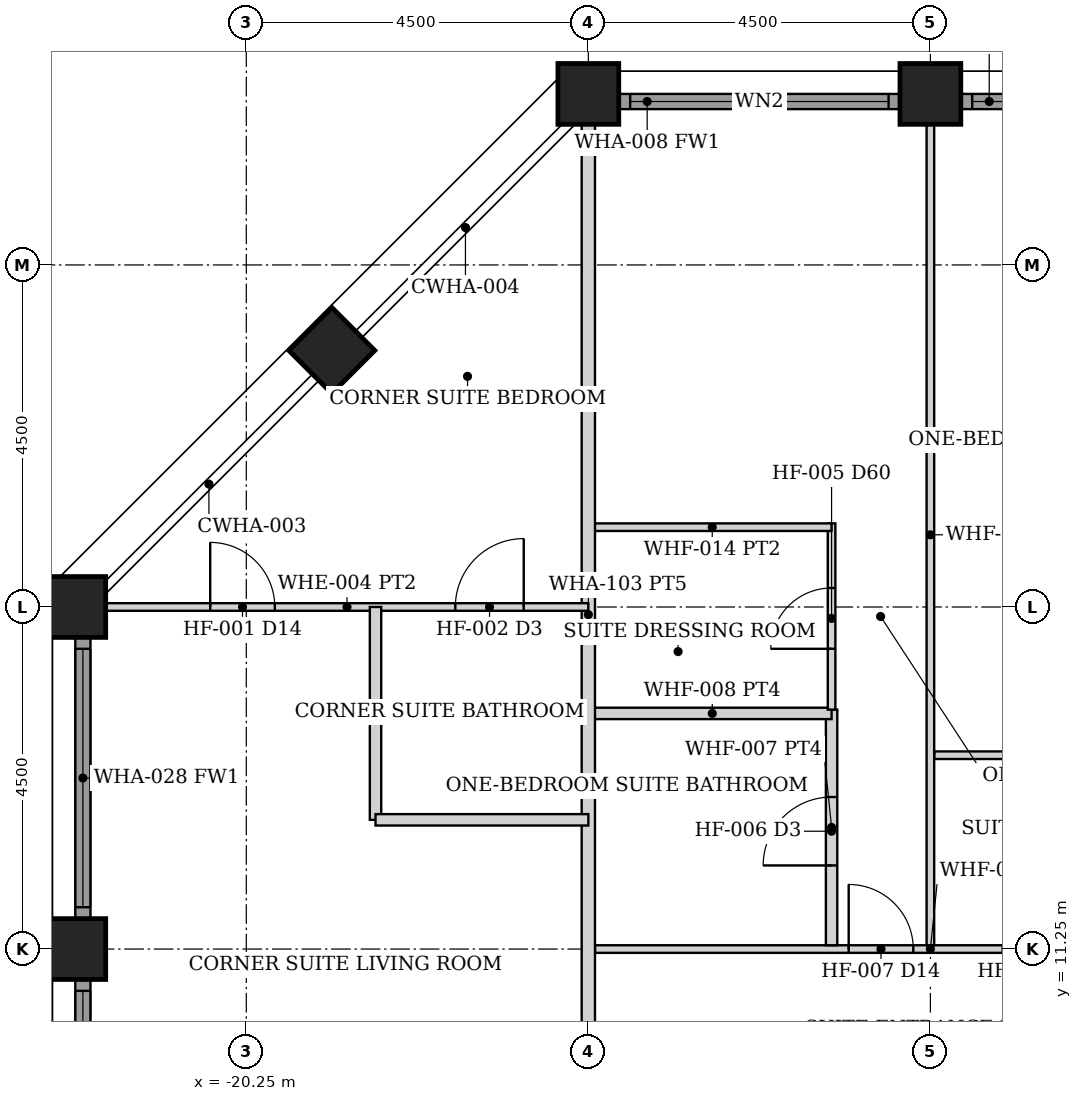
"""IFC4 building model, lengths in metres.
Left out: names, types, materials, properties, quantities, classifications, styles, units other than length and angle.
Written with IfcOpenShell. Run it as: python <this file> out.ifc"""

import sys

from ifc_helpers import new_model, si_unit, direction, frame, frame_2d, origin, origin_2d, place, context, subcontext, project, spatial, rectangle, hollow_rectangle, extrude, element, fill, save


model = new_model("IFC4")
c1 = context("Model", 3, precision=1e-05, world=origin(), true_north=direction((0.0, 1.0)))
c2 = subcontext(c1, "Body", "Model", "MODEL_VIEW")
j1 = project(units=[si_unit("LENGTHUNIT", "METRE"), si_unit("PLANEANGLEUNIT", "RADIAN")], contexts=[c1])
p1 = place(None, origin())
s1 = spatial("IfcSite", under=j1, at=p1, CompositionType="ELEMENT")
p2 = place(p1, origin())
s2 = spatial("IfcBuilding", under=s1, at=p2, CompositionType="ELEMENT")
p3 = place(p2, frame((0.0, 0.0, 172.4)))
s3 = spatial("IfcBuildingStorey", under=s2, at=p3, CompositionType="ELEMENT", Elevation=172.4)
for number, where, z_axis, x_axis in (
    (1, (-15.75, 22.5, 0.0), (0.0, 0.0, 1.0), (0.0, 1.0, 0.0)),
    (2, (-11.25, 22.5, 0.0), (0.0, 0.0, 1.0), (0.0, 1.0, 0.0)),
    (3, (-22.5, 11.25, 0.0), (0.0, 0.0, 1.0), (1.0, 0.0, 0.0)),
    (4, (-22.5, 15.75, 0.0), (0.0, 0.0, 1.0), (1.0, 0.0, 0.0)),
    (5, (-19.125, 19.125, 0.0), (0.0, 0.0, 1.0), (0.707, -0.707, 0.0)),
):
    element("IfcColumn", number, at=place(p3, frame(where, z_axis=z_axis, x_axis=x_axis)), inside=s3, PredefinedType="COLUMN", context=c2, shape_type="SweptSolid", body=[
        extrude(hollow_rectangle(XDim=0.8, YDim=0.8, WallThickness=0.045, at=origin_2d()), origin(), (0.0, 0.0, 1.0), 3.6),
    ])
p4 = place(p3, frame((-15.345, 22.4, 0.0), z_axis=(0.0, 0.0, 1.0), x_axis=(1.0, 0.0, 0.0)))
e6 = element("IfcWall", 6, at=p4, inside=s3, PredefinedType="SOLIDWALL", context=c2, shape_type="SweptSolid", body=[
    extrude(rectangle(XDim=3.69, YDim=0.2, at=frame_2d((1.845, 0.0))), origin(), (0.0, 0.0, 1.0), 2.479),
])
p5 = place(p4, frame((0.145, 0.0, 0.3)))
e7 = element("IfcOpeningElement", 7, at=p5, cuts=e6, PredefinedType="OPENING", context=c2, shape_type="SweptSolid", body=[
    extrude(rectangle(XDim=3.4, YDim=2.029, at=frame_2d((1.7, 1.015))), frame((0.0, 0.11, 0.0), z_axis=(0.0, -1.0, 0.0), x_axis=(1.0, 0.0, 0.0)), (0.0, 0.0, 1.0), 0.22),
])
p6 = place(p3, frame((-10.845, 22.4, 0.0), z_axis=(0.0, 0.0, 1.0), x_axis=(1.0, 0.0, 0.0)))
e8 = element("IfcWall", 8, at=p6, inside=s3, PredefinedType="SOLIDWALL", context=c2, shape_type="SweptSolid", body=[
    extrude(rectangle(XDim=3.69, YDim=0.2, at=frame_2d((1.845, 0.0))), origin(), (0.0, 0.0, 1.0), 2.479),
])
p7 = place(p6, frame((0.145, 0.0, 0.3)))
e9 = element("IfcOpeningElement", 9, at=p7, cuts=e8, PredefinedType="OPENING", context=c2, shape_type="SweptSolid", body=[
    extrude(rectangle(XDim=3.4, YDim=2.029, at=frame_2d((1.7, 1.015))), frame((0.0, 0.11, 0.0), z_axis=(0.0, -1.0, 0.0), x_axis=(1.0, 0.0, 0.0)), (0.0, 0.0, 1.0), 0.22),
])
p8 = place(p3, frame((-22.4, 7.155, 0.0), z_axis=(0.0, 0.0, 1.0), x_axis=(0.0, 1.0, 0.0)))
e10 = element("IfcWall", 10, at=p8, inside=s3, PredefinedType="SOLIDWALL", context=c2, shape_type="SweptSolid", body=[
    extrude(rectangle(XDim=3.69, YDim=0.2, at=frame_2d((1.845, 0.0))), origin(), (0.0, 0.0, 1.0), 2.479),
])
p9 = place(p8, frame((0.145, 0.0, 0.3)))
e11 = element("IfcOpeningElement", 11, at=p9, cuts=e10, PredefinedType="OPENING", context=c2, shape_type="SweptSolid", body=[
    extrude(rectangle(XDim=3.4, YDim=2.029, at=frame_2d((1.7, 1.015))), frame((0.0, 0.11, 0.0), z_axis=(0.0, -1.0, 0.0), x_axis=(1.0, 0.0, 0.0)), (0.0, 0.0, 1.0), 0.22),
])
p10 = place(p3, frame((-22.4, 11.655, 0.0), z_axis=(0.0, 0.0, 1.0), x_axis=(0.0, 1.0, 0.0)))
e12 = element("IfcWall", 12, at=p10, inside=s3, PredefinedType="SOLIDWALL", context=c2, shape_type="SweptSolid", body=[
    extrude(rectangle(XDim=3.69, YDim=0.2, at=frame_2d((1.845, 0.0))), origin(), (0.0, 0.0, 1.0), 2.479),
])
p11 = place(p10, frame((0.145, 0.0, 0.3)))
e13 = element("IfcOpeningElement", 13, at=p11, cuts=e12, PredefinedType="OPENING", context=c2, shape_type="SweptSolid", body=[
    extrude(rectangle(XDim=3.4, YDim=2.029, at=frame_2d((1.7, 1.015))), frame((0.0, 0.11, 0.0), z_axis=(0.0, -1.0, 0.0), x_axis=(1.0, 0.0, 0.0)), (0.0, 0.0, 1.0), 0.22),
])
p12 = place(p3, frame((-15.663, 11.25, 0.0), z_axis=(0.0, 0.0, 1.0), x_axis=(1.0, 0.0, 0.0)))
e14 = element("IfcWall", 14, at=p12, inside=s3, PredefinedType="PARTITIONING", context=c2, shape_type="SweptSolid", body=[
    extrude(rectangle(XDim=8.825, YDim=0.1, at=frame_2d((4.413, 0.0))), origin(), (0.0, 0.0, 1.0), 2.473),
])
p13 = place(p12, frame((5.363, 0.0, 0.0)))
e15 = element("IfcOpeningElement", 15, at=p13, cuts=e14, PredefinedType="OPENING", context=c2, shape_type="SweptSolid", body=[
    extrude(rectangle(XDim=0.9, YDim=2.1, at=frame_2d((0.45, 1.05))), frame((0.0, 0.06, 0.0), z_axis=(0.0, -1.0, 0.0), x_axis=(1.0, 0.0, 0.0)), (0.0, 0.0, 1.0), 0.12),
])
p14 = place(p12, frame((7.613, 0.0, 0.0)))
e16 = element("IfcOpeningElement", 16, at=p14, cuts=e14, PredefinedType="OPENING", context=c2, shape_type="SweptSolid", body=[
    extrude(rectangle(XDim=0.9, YDim=2.1, at=frame_2d((0.45, 1.05))), frame((0.0, 0.06, 0.0), z_axis=(0.0, -1.0, 0.0), x_axis=(1.0, 0.0, 0.0)), (0.0, 0.0, 1.0), 0.12),
])
p15 = place(p12, frame((3.337, 0.0, 0.0)))
e17 = element("IfcOpeningElement", 17, at=p15, cuts=e14, PredefinedType="OPENING", context=c2, shape_type="SweptSolid", body=[
    extrude(rectangle(XDim=0.85, YDim=2.1, at=frame_2d((0.425, 1.05))), frame((0.0, 0.06, 0.0), z_axis=(0.0, -1.0, 0.0), x_axis=(1.0, 0.0, 0.0)), (0.0, 0.0, 1.0), 0.12),
])
p16 = place(p3, frame((-11.2, 13.8, 0.0), z_axis=(0.0, 0.0, 1.0), x_axis=(1.0, 0.0, 0.0)))
e18 = element("IfcWall", 18, at=p16, inside=s3, PredefinedType="PARTITIONING", context=c2, shape_type="SweptSolid", body=[
    extrude(rectangle(XDim=2.75, YDim=0.1, at=frame_2d((1.375, 0.0))), origin(), (0.0, 0.0, 1.0), 2.473),
])
p17 = place(p3, frame((-11.25, 11.3, 0.0), z_axis=(0.0, 0.0, 1.0), x_axis=(0.0, 1.0, 0.0)))
e19 = element("IfcWall", 19, at=p17, inside=s3, PredefinedType="PARTITIONING", context=c2, shape_type="SweptSolid", body=[
    extrude(rectangle(XDim=10.8, YDim=0.1, at=frame_2d((5.4, 0.0))), origin(), (0.0, 0.0, 1.0), 2.473),
])
p18 = place(p3, frame((-12.55, 11.3, 0.0), z_axis=(0.0, 0.0, 1.0), x_axis=(0.0, 1.0, 0.0)))
e20 = element("IfcWall", 20, at=p18, inside=s3, PredefinedType="PARTITIONING", context=c2, shape_type="SweptSolid", body=[
    extrude(rectangle(XDim=3.1, YDim=0.15, at=frame_2d((1.55, 0.0))), origin(), (0.0, 0.0, 1.0), 2.473),
])
p19 = place(p18, frame((1.05, 0.0, 0.0)))
e21 = element("IfcOpeningElement", 21, at=p19, cuts=e20, PredefinedType="OPENING", context=c2, shape_type="SweptSolid", body=[
    extrude(rectangle(XDim=0.9, YDim=2.1, at=frame_2d((0.45, 1.05))), frame((0.0, 0.085, 0.0), z_axis=(0.0, -1.0, 0.0), x_axis=(1.0, 0.0, 0.0)), (0.0, 0.0, 1.0), 0.17),
])
p20 = place(p3, frame((-15.69, 14.35, 0.0), z_axis=(0.0, 0.0, 1.0), x_axis=(1.0, 0.0, 0.0)))
e22 = element("IfcWall", 22, at=p20, inside=s3, PredefinedType="PARTITIONING", context=c2, shape_type="SweptSolid", body=[
    extrude(rectangle(XDim=3.14, YDim=0.15, at=frame_2d((1.57, 0.0))), origin(), (0.0, 0.0, 1.0), 2.473),
])
p21 = place(p3, frame((-12.55, 14.4, 0.0), z_axis=(0.0, 0.0, 1.0), x_axis=(0.0, 1.0, 0.0)))
e23 = element("IfcWall", 23, at=p21, inside=s3, PredefinedType="PARTITIONING", context=c2, shape_type="SweptSolid", body=[
    extrude(rectangle(XDim=2.45, YDim=0.1, at=frame_2d((1.225, 0.0))), origin(), (0.0, 0.0, 1.0), 2.473),
])
p22 = place(p21, frame((0.8, 0.0, 0.0)))
e24 = element("IfcOpeningElement", 24, at=p22, cuts=e23, PredefinedType="OPENING", context=c2, shape_type="SweptSolid", body=[
    extrude(rectangle(XDim=0.8, YDim=2.1, at=frame_2d((0.4, 1.05))), frame((0.0, 0.06, 0.0), z_axis=(0.0, -1.0, 0.0), x_axis=(1.0, 0.0, 0.0)), (0.0, 0.0, 1.0), 0.12),
])
p23 = place(p3, frame((-15.69, 16.8, 0.0), z_axis=(0.0, 0.0, 1.0), x_axis=(1.0, 0.0, 0.0)))
e25 = element("IfcWall", 25, at=p23, inside=s3, PredefinedType="PARTITIONING", context=c2, shape_type="SweptSolid", body=[
    extrude(rectangle(XDim=3.14, YDim=0.1, at=frame_2d((1.57, 0.0))), origin(), (0.0, 0.0, 1.0), 2.473),
])
p24 = place(p3, frame((-15.75, 9.2, 0.0), z_axis=(0.0, 0.0, 1.0), x_axis=(0.0, 1.0, 0.0)))
e26 = element("IfcWall", 26, at=p24, inside=s3, PredefinedType="PARTITIONING", context=c2, shape_type="SweptSolid", body=[
    extrude(rectangle(XDim=12.9, YDim=0.175, at=frame_2d((6.45, 0.0))), origin(), (0.0, 0.0, 1.0), 2.473),
])
p25 = place(p3, frame((-22.1, 15.75, 0.0), z_axis=(0.0, 0.0, 1.0), x_axis=(1.0, 0.0, 0.0)))
e27 = element("IfcWall", 27, at=p25, inside=s3, PredefinedType="PARTITIONING", context=c2, shape_type="SweptSolid", body=[
    extrude(rectangle(XDim=6.35, YDim=0.1, at=frame_2d((3.175, 0.0))), origin(), (0.0, 0.0, 1.0), 2.473),
])
p26 = place(p25, frame((1.375, 0.0, 0.0)))
e28 = element("IfcOpeningElement", 28, at=p26, cuts=e27, PredefinedType="OPENING", context=c2, shape_type="SweptSolid", body=[
    extrude(rectangle(XDim=0.85, YDim=2.1, at=frame_2d((0.425, 1.05))), frame((0.0, 0.06, 0.0), z_axis=(0.0, -1.0, 0.0), x_axis=(1.0, 0.0, 0.0)), (0.0, 0.0, 1.0), 0.12),
])
p27 = place(p25, frame((4.6, 0.0, 0.0)))
e29 = element("IfcOpeningElement", 29, at=p27, cuts=e27, PredefinedType="OPENING", context=c2, shape_type="SweptSolid", body=[
    extrude(rectangle(XDim=0.9, YDim=2.1, at=frame_2d((0.45, 1.05))), frame((0.0, 0.06, 0.0), z_axis=(0.0, -1.0, 0.0), x_axis=(1.0, 0.0, 0.0)), (0.0, 0.0, 1.0), 0.12),
])
for number, where, z_axis, x_axis in (
    (30, (-18.55, 12.95, 0.0), (0.0, 0.0, 1.0), (0.0, 1.0, 0.0)),
    (31, (-18.55, 12.95, 0.0), (0.0, 0.0, 1.0), (1.0, 0.0, 0.0)),
):
    element("IfcWall", number, at=place(p3, frame(where, z_axis=z_axis, x_axis=x_axis)), inside=s3, PredefinedType="PARTITIONING", context=c2, shape_type="SweptSolid", body=[
        extrude(rectangle(XDim=2.8, YDim=0.15, at=frame_2d((1.4, 0.0))), origin(), (0.0, 0.0, 1.0), 2.473),
    ])
p28 = place(p5, origin())
e32 = element("IfcWindow", 32, at=p28, inside=s3, PartitioningType="SINGLE_PANEL", PredefinedType="WINDOW", context=c2, shape_type="SweptSolid", body=[
    extrude(rectangle(XDim=3.4, YDim=2.029, at=frame_2d((1.7, 1.015))), frame((0.0, 0.03, 0.0), z_axis=(0.0, -1.0, 0.0), x_axis=(1.0, 0.0, 0.0)), (0.0, 0.0, 1.0), 0.06),
])
fill(e7, e32)
p29 = place(p7, origin())
e33 = element("IfcWindow", 33, at=p29, inside=s3, PartitioningType="SINGLE_PANEL", PredefinedType="WINDOW", context=c2, shape_type="SweptSolid", body=[
    extrude(rectangle(XDim=3.4, YDim=2.029, at=frame_2d((1.7, 1.015))), frame((0.0, 0.03, 0.0), z_axis=(0.0, -1.0, 0.0), x_axis=(1.0, 0.0, 0.0)), (0.0, 0.0, 1.0), 0.06),
])
fill(e9, e33)
p30 = place(p9, origin())
e34 = element("IfcWindow", 34, at=p30, inside=s3, PartitioningType="SINGLE_PANEL", PredefinedType="WINDOW", context=c2, shape_type="SweptSolid", body=[
    extrude(rectangle(XDim=3.4, YDim=2.029, at=frame_2d((1.7, 1.015))), frame((0.0, 0.03, 0.0), z_axis=(0.0, -1.0, 0.0), x_axis=(1.0, 0.0, 0.0)), (0.0, 0.0, 1.0), 0.06),
])
fill(e11, e34)
p31 = place(p11, origin())
e35 = element("IfcWindow", 35, at=p31, inside=s3, PartitioningType="SINGLE_PANEL", PredefinedType="WINDOW", context=c2, shape_type="SweptSolid", body=[
    extrude(rectangle(XDim=3.4, YDim=2.029, at=frame_2d((1.7, 1.015))), frame((0.0, 0.03, 0.0), z_axis=(0.0, -1.0, 0.0), x_axis=(1.0, 0.0, 0.0)), (0.0, 0.0, 1.0), 0.06),
])
fill(e13, e35)
p32 = place(p15, origin())
e36 = element("IfcDoor", 36, at=p32, inside=s3, OperationType="SINGLE_SWING_LEFT", PredefinedType="DOOR", context=c2, shape_type="SweptSolid", body=[
    extrude(rectangle(XDim=0.85, YDim=2.1, at=frame_2d((0.425, 1.05))), frame((0.0, 0.025, 0.0), z_axis=(0.0, -1.0, 0.0), x_axis=(1.0, 0.0, 0.0)), (0.0, 0.0, 1.0), 0.05),
])
fill(e17, e36)
p33 = place(p19, origin())
e37 = element("IfcDoor", 37, at=p33, inside=s3, OperationType="SINGLE_SWING_LEFT", PredefinedType="DOOR", context=c2, shape_type="SweptSolid", body=[
    extrude(rectangle(XDim=0.9, YDim=2.1, at=frame_2d((0.45, 1.05))), frame((0.0, 0.025, 0.0), z_axis=(0.0, -1.0, 0.0), x_axis=(1.0, 0.0, 0.0)), (0.0, 0.0, 1.0), 0.05),
])
fill(e21, e37)
p34 = place(p22, origin())
e38 = element("IfcDoor", 38, at=p34, inside=s3, OperationType="SINGLE_SWING_LEFT", PredefinedType="DOOR", context=c2, shape_type="SweptSolid", body=[
    extrude(rectangle(XDim=0.8, YDim=2.1, at=frame_2d((0.4, 1.05))), frame((0.0, 0.025, 0.0), z_axis=(0.0, -1.0, 0.0), x_axis=(1.0, 0.0, 0.0)), (0.0, 0.0, 1.0), 0.05),
])
fill(e24, e38)
p35 = place(p26, origin())
e39 = element("IfcDoor", 39, at=p35, inside=s3, OperationType="SINGLE_SWING_LEFT", PredefinedType="DOOR", context=c2, shape_type="SweptSolid", body=[
    extrude(rectangle(XDim=0.85, YDim=2.1, at=frame_2d((0.425, 1.05))), frame((0.0, 0.025, 0.0), z_axis=(0.0, -1.0, 0.0), x_axis=(1.0, 0.0, 0.0)), (0.0, 0.0, 1.0), 0.05),
])
fill(e28, e39)
p36 = place(p27, origin())
e40 = element("IfcDoor", 40, at=p36, inside=s3, OperationType="SINGLE_SWING_RIGHT", PredefinedType="DOOR", context=c2, shape_type="SweptSolid", body=[
    extrude(rectangle(XDim=0.9, YDim=2.1, at=frame_2d((0.45, 1.05))), frame((0.0, 0.025, 0.0), z_axis=(0.0, -1.0, 0.0), x_axis=(1.0, 0.0, 0.0)), (0.0, 0.0, 1.0), 0.05),
])
fill(e29, e40)
save(model, sys.argv[1])
